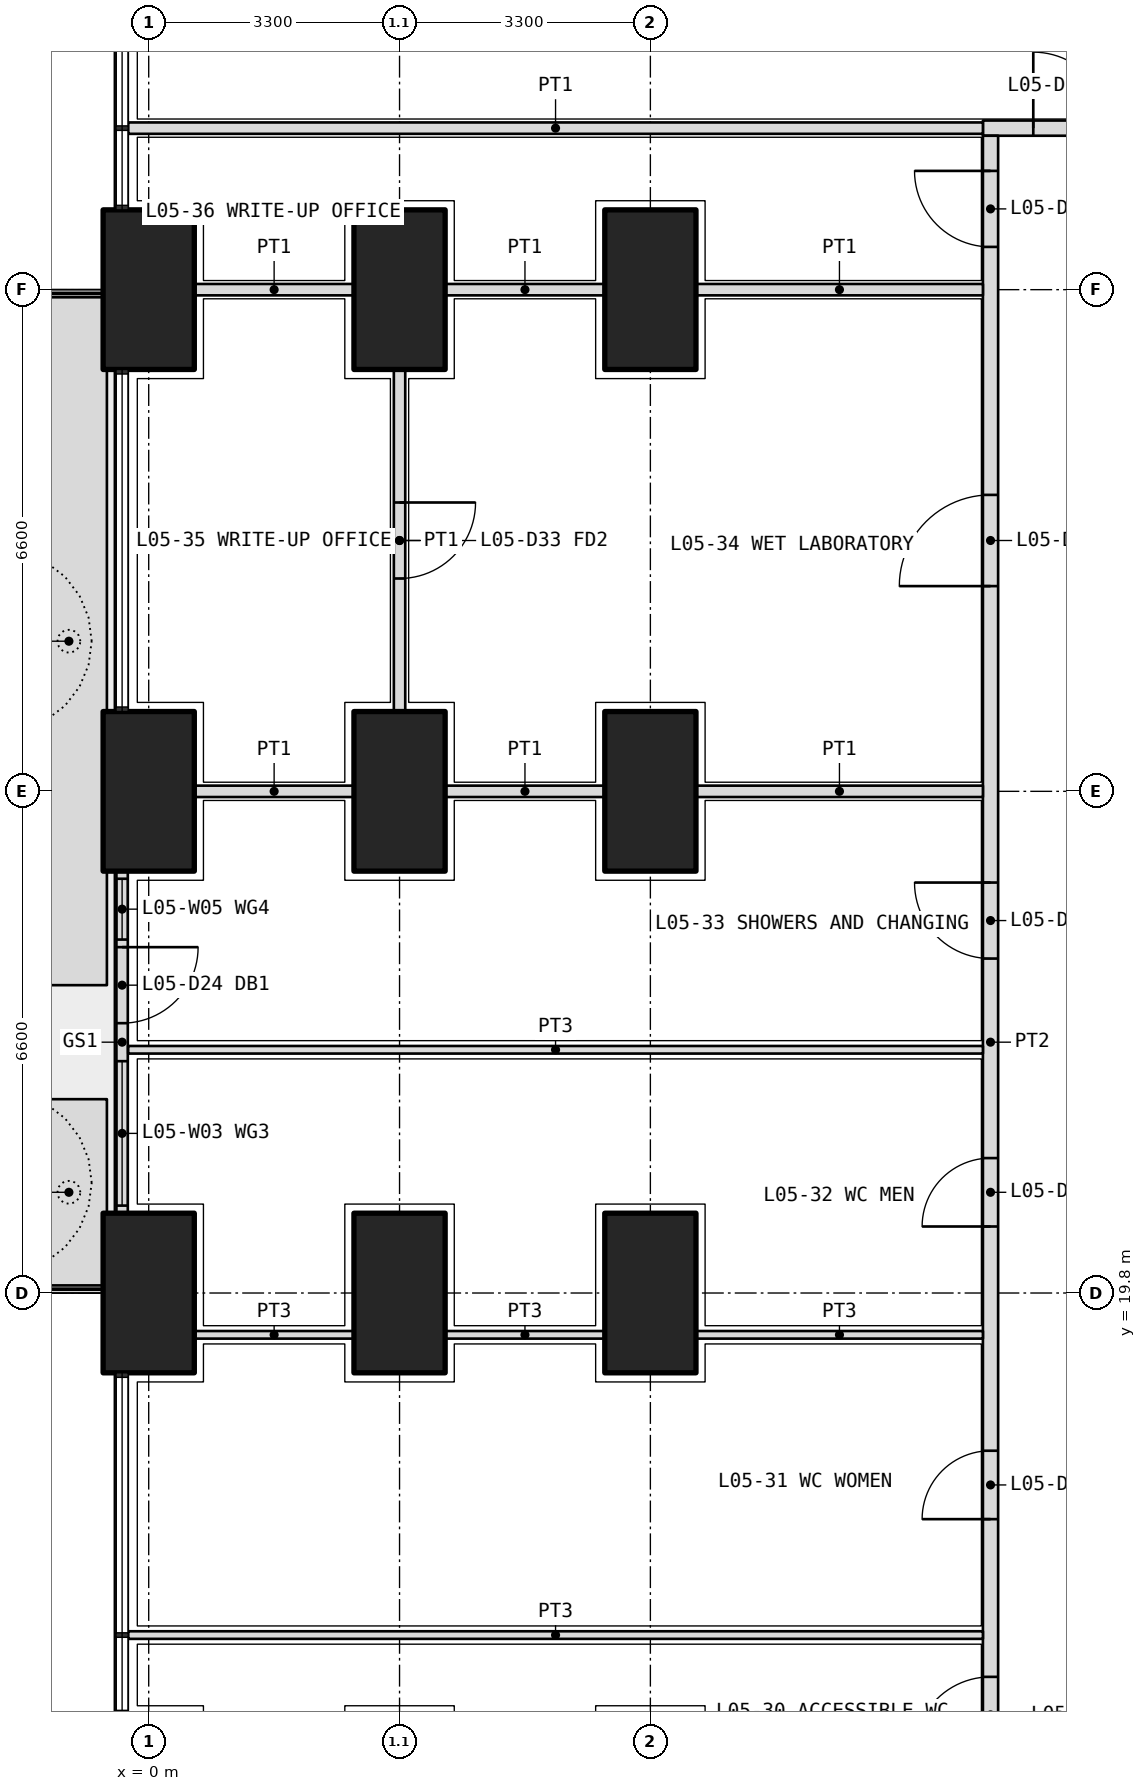
"""IFC4 building model, lengths in metres.
Left out: names, types, materials, properties, quantities, classifications, styles, units other than length and angle.
Written with IfcOpenShell. Run it as: python <this file> out.ifc"""

import sys

from ifc_helpers import new_model, si_unit, direction, frame, frame_2d, origin, origin_2d, place, context, subcontext, project, spatial, polyline, rectangle, outline, extrude, element, fill, save


model = new_model("IFC4")
c1 = context("Model", 3, precision=1e-05, world=origin(), true_north=direction((0.0, 1.0)))
c2 = subcontext(c1, "Body", "Model", "MODEL_VIEW")
j1 = project(units=[si_unit("LENGTHUNIT", "METRE"), si_unit("PLANEANGLEUNIT", "RADIAN")], contexts=[c1])
p1 = place(None, origin())
s1 = spatial("IfcSite", under=j1, at=p1, CompositionType="ELEMENT")
p2 = place(p1, origin())
s2 = spatial("IfcBuilding", under=s1, at=p2, CompositionType="ELEMENT")
p3 = place(p2, frame((0.0, 0.0, 25.5)))
s3 = spatial("IfcBuildingStorey", under=s2, at=p3, CompositionType="ELEMENT", Elevation=25.5)
for number, where, z_axis, x_axis in (
    (1, (0.0, 19.8, 0.0), (0.0, 0.0, 1.0), (0.0, 1.0, 0.0)),
    (2, (0.0, 26.4, 0.0), (0.0, 0.0, 1.0), (0.0, 1.0, 0.0)),
    (3, (0.0, 33.0, 0.0), (0.0, 0.0, 1.0), (0.0, 1.0, 0.0)),
    (4, (3.3, 19.8, 0.0), (0.0, 0.0, 1.0), (0.0, 1.0, 0.0)),
    (5, (3.3, 26.4, 0.0), (0.0, 0.0, 1.0), (0.0, 1.0, 0.0)),
    (6, (3.3, 33.0, 0.0), (0.0, 0.0, 1.0), (0.0, 1.0, 0.0)),
    (7, (6.6, 19.8, 0.0), (0.0, 0.0, 1.0), (0.0, 1.0, 0.0)),
    (8, (6.6, 26.4, 0.0), (0.0, 0.0, 1.0), (0.0, 1.0, 0.0)),
    (9, (6.6, 33.0, 0.0), (0.0, 0.0, 1.0), (0.0, 1.0, 0.0)),
):
    element("IfcColumn", number, at=place(p3, frame(where, z_axis=z_axis, x_axis=x_axis)), inside=s3, PredefinedType="COLUMN", context=c2, shape_type="SweptSolid", body=[
        extrude(rectangle(XDim=2.1, YDim=1.2, at=origin_2d()), origin(), (0.0, 0.0, 1.0), 4.2),
    ])
p4 = place(p3, origin())
e10 = element("IfcWall", 10, at=p4, inside=s3, PredefinedType="USERDEFINED", context=c2, shape_type="SweptSolid", body=[
    extrude(outline(polyline([(-1.55, 19.9), (-0.55, 19.9), (-0.55, 22.35), (-1.55, 22.35), (-1.55, 19.9)]), holes=[polyline([(-1.4, 20.05), (-0.7, 20.05), (-0.7, 22.2), (-1.4, 22.2), (-1.4, 20.05)])]), origin(), (0.0, 0.0, 1.0), 1.05),
])
p5 = place(p3, origin())
e11 = element("IfcWall", 11, at=p5, inside=s3, PredefinedType="USERDEFINED", context=c2, shape_type="SweptSolid", body=[
    extrude(outline(polyline([(-1.55, 23.85), (-0.55, 23.85), (-0.55, 32.9), (-1.55, 32.9), (-1.55, 23.85)]), holes=[polyline([(-1.4, 24.0), (-0.7, 24.0), (-0.7, 32.75), (-1.4, 32.75), (-1.4, 24.0)])]), origin(), (0.0, 0.0, 1.0), 1.05),
])
p6 = place(p3, frame((-0.35, 25.35, 0.0), z_axis=(0.0, 0.0, 1.0), x_axis=(0.0, -1.0, 0.0)))
e12 = element("IfcWall", 12, at=p6, inside=s3, PredefinedType="SOLIDWALL", context=c2, shape_type="SweptSolid", body=[
    extrude(rectangle(XDim=4.5, YDim=0.15, at=frame_2d((2.25, 0.0))), origin(), (0.0, 0.0, 1.0), 2.7),
])
p7 = place(p6, frame((1.0, 0.0, 0.0)))
e13 = element("IfcOpeningElement", 13, at=p7, cuts=e12, PredefinedType="OPENING", context=c2, shape_type="SweptSolid", body=[
    extrude(rectangle(XDim=1.0, YDim=2.4, at=frame_2d((0.5, 1.2))), frame((0.0, 0.085, 0.0), z_axis=(0.0, -1.0, 0.0), x_axis=(1.0, 0.0, 0.0)), (0.0, 0.0, 1.0), 0.17),
])
p8 = place(p6, frame((0.1, 0.0, 0.1)))
e14 = element("IfcOpeningElement", 14, at=p8, cuts=e12, PredefinedType="OPENING", context=c2, shape_type="SweptSolid", body=[
    extrude(rectangle(XDim=0.8, YDim=2.3, at=frame_2d((0.4, 1.15))), frame((0.0, 0.085, 0.0), z_axis=(0.0, -1.0, 0.0), x_axis=(1.0, 0.0, 0.0)), (0.0, 0.0, 1.0), 0.17),
])
p9 = place(p6, frame((2.5, 0.0, 0.1)))
e15 = element("IfcOpeningElement", 15, at=p9, cuts=e12, PredefinedType="OPENING", context=c2, shape_type="SweptSolid", body=[
    extrude(rectangle(XDim=1.9, YDim=2.3, at=frame_2d((0.95, 1.15))), frame((0.0, 0.085, 0.0), z_axis=(0.0, -1.0, 0.0), x_axis=(1.0, 0.0, 0.0)), (0.0, 0.0, 1.0), 0.17),
])
p10 = place(p3, frame((10.975, 35.125, 0.0), z_axis=(0.0, 0.0, 1.0), x_axis=(1.0, 0.0, 0.0)))
e16 = element("IfcWall", 16, at=p10, inside=s3, PredefinedType="PARTITIONING", context=c2, shape_type="SweptSolid", body=[
    extrude(rectangle(XDim=30.85, YDim=0.2, at=frame_2d((15.425, 0.0))), origin(), (0.0, 0.0, 1.0), 2.85),
])
p11 = place(p10, frame((0.663, 0.0, 0.0)))
e17 = element("IfcOpeningElement", 17, at=p11, cuts=e16, PredefinedType="OPENING", context=c2, shape_type="SweptSolid", body=[
    extrude(rectangle(XDim=1.0, YDim=2.1, at=frame_2d((0.5, 1.05))), frame((0.0, 0.11, 0.0), z_axis=(0.0, -1.0, 0.0), x_axis=(1.0, 0.0, 0.0)), (0.0, 0.0, 1.0), 0.22),
])
p12 = place(p10, frame((4.925, 0.0, 0.0)))
e18 = element("IfcOpeningElement", 18, at=p12, cuts=e16, PredefinedType="OPENING", context=c2, shape_type="SweptSolid", body=[
    extrude(rectangle(XDim=1.2, YDim=2.1, at=frame_2d((0.6, 1.05))), frame((0.0, 0.11, 0.0), z_axis=(0.0, -1.0, 0.0), x_axis=(1.0, 0.0, 0.0)), (0.0, 0.0, 1.0), 0.22),
])
p13 = place(p10, frame((9.975, 0.0, 0.0)))
e19 = element("IfcOpeningElement", 19, at=p13, cuts=e16, PredefinedType="OPENING", context=c2, shape_type="SweptSolid", body=[
    extrude(rectangle(XDim=1.0, YDim=2.1, at=frame_2d((0.5, 1.05))), frame((0.0, 0.11, 0.0), z_axis=(0.0, -1.0, 0.0), x_axis=(1.0, 0.0, 0.0)), (0.0, 0.0, 1.0), 0.22),
])
p14 = place(p10, frame((13.725, 0.0, 0.0)))
e20 = element("IfcOpeningElement", 20, at=p14, cuts=e16, PredefinedType="OPENING", context=c2, shape_type="SweptSolid", body=[
    extrude(rectangle(XDim=1.0, YDim=2.1, at=frame_2d((0.5, 1.05))), frame((0.0, 0.11, 0.0), z_axis=(0.0, -1.0, 0.0), x_axis=(1.0, 0.0, 0.0)), (0.0, 0.0, 1.0), 0.22),
])
p15 = place(p10, frame((17.025, 0.0, 0.0)))
e21 = element("IfcOpeningElement", 21, at=p15, cuts=e16, PredefinedType="OPENING", context=c2, shape_type="SweptSolid", body=[
    extrude(rectangle(XDim=1.0, YDim=2.1, at=frame_2d((0.5, 1.05))), frame((0.0, 0.11, 0.0), z_axis=(0.0, -1.0, 0.0), x_axis=(1.0, 0.0, 0.0)), (0.0, 0.0, 1.0), 0.22),
])
p16 = place(p10, frame((24.137, 0.0, 0.0)))
e22 = element("IfcOpeningElement", 22, at=p16, cuts=e16, PredefinedType="OPENING", context=c2, shape_type="SweptSolid", body=[
    extrude(rectangle(XDim=1.2, YDim=2.1, at=frame_2d((0.6, 1.05))), frame((0.0, 0.11, 0.0), z_axis=(0.0, -1.0, 0.0), x_axis=(1.0, 0.0, 0.0)), (0.0, 0.0, 1.0), 0.22),
])
p17 = place(p3, frame((11.075, 11.175, 0.0), z_axis=(0.0, 0.0, 1.0), x_axis=(0.0, 1.0, 0.0)))
e23 = element("IfcWall", 23, at=p17, inside=s3, PredefinedType="PARTITIONING", context=c2, shape_type="SweptSolid", body=[
    extrude(rectangle(XDim=23.85, YDim=0.2, at=frame_2d((11.925, 0.0))), origin(), (0.0, 0.0, 1.0), 2.85),
])
p18 = place(p17, frame((0.363, 0.0, 0.0)))
e24 = element("IfcOpeningElement", 24, at=p18, cuts=e23, PredefinedType="OPENING", context=c2, shape_type="SweptSolid", body=[
    extrude(rectangle(XDim=1.2, YDim=2.1, at=frame_2d((0.6, 1.05))), frame((0.0, 0.11, 0.0), z_axis=(0.0, -1.0, 0.0), x_axis=(1.0, 0.0, 0.0)), (0.0, 0.0, 1.0), 0.22),
])
p19 = place(p17, frame((2.575, 0.0, 0.0)))
e25 = element("IfcOpeningElement", 25, at=p19, cuts=e23, PredefinedType="OPENING", context=c2, shape_type="SweptSolid", body=[
    extrude(rectangle(XDim=1.0, YDim=2.1, at=frame_2d((0.5, 1.05))), frame((0.0, 0.11, 0.0), z_axis=(0.0, -1.0, 0.0), x_axis=(1.0, 0.0, 0.0)), (0.0, 0.0, 1.0), 0.22),
])
p20 = place(p17, frame((5.65, 0.0, 0.0)))
e26 = element("IfcOpeningElement", 26, at=p20, cuts=e23, PredefinedType="OPENING", context=c2, shape_type="SweptSolid", body=[
    extrude(rectangle(XDim=0.9, YDim=2.1, at=frame_2d((0.45, 1.05))), frame((0.0, 0.11, 0.0), z_axis=(0.0, -1.0, 0.0), x_axis=(1.0, 0.0, 0.0)), (0.0, 0.0, 1.0), 0.22),
])
p21 = place(p17, frame((9.5, 0.0, 0.0)))
e27 = element("IfcOpeningElement", 27, at=p21, cuts=e23, PredefinedType="OPENING", context=c2, shape_type="SweptSolid", body=[
    extrude(rectangle(XDim=0.9, YDim=2.1, at=frame_2d((0.45, 1.05))), frame((0.0, 0.11, 0.0), z_axis=(0.0, -1.0, 0.0), x_axis=(1.0, 0.0, 0.0)), (0.0, 0.0, 1.0), 0.22),
])
p22 = place(p17, frame((13.025, 0.0, 0.0)))
e28 = element("IfcOpeningElement", 28, at=p22, cuts=e23, PredefinedType="OPENING", context=c2, shape_type="SweptSolid", body=[
    extrude(rectangle(XDim=1.0, YDim=2.1, at=frame_2d((0.5, 1.05))), frame((0.0, 0.11, 0.0), z_axis=(0.0, -1.0, 0.0), x_axis=(1.0, 0.0, 0.0)), (0.0, 0.0, 1.0), 0.22),
])
p23 = place(p17, frame((17.925, 0.0, 0.0)))
e29 = element("IfcOpeningElement", 29, at=p23, cuts=e23, PredefinedType="OPENING", context=c2, shape_type="SweptSolid", body=[
    extrude(rectangle(XDim=1.2, YDim=2.1, at=frame_2d((0.6, 1.05))), frame((0.0, 0.11, 0.0), z_axis=(0.0, -1.0, 0.0), x_axis=(1.0, 0.0, 0.0)), (0.0, 0.0, 1.0), 0.22),
])
p24 = place(p17, frame((22.387, 0.0, 0.0)))
e30 = element("IfcOpeningElement", 30, at=p24, cuts=e23, PredefinedType="OPENING", context=c2, shape_type="SweptSolid", body=[
    extrude(rectangle(XDim=1.0, YDim=2.1, at=frame_2d((0.5, 1.05))), frame((0.0, 0.11, 0.0), z_axis=(0.0, -1.0, 0.0), x_axis=(1.0, 0.0, 0.0)), (0.0, 0.0, 1.0), 0.22),
])
p25 = place(p3, frame((-0.27, 35.125, 0.0), z_axis=(0.0, 0.0, 1.0), x_axis=(1.0, 0.0, 0.0)))
e31 = element("IfcWall", 31, at=p25, inside=s3, PredefinedType="PARTITIONING", context=c2, shape_type="SweptSolid", body=[
    extrude(rectangle(XDim=11.245, YDim=0.15, at=frame_2d((5.623, 0.0))), origin(), (0.0, 0.0, 1.0), 2.7),
])
p26 = place(p3, frame((3.3, 31.95, 0.0), z_axis=(0.0, 0.0, 1.0), x_axis=(0.0, -1.0, 0.0)))
e32 = element("IfcWall", 32, at=p26, inside=s3, PredefinedType="PARTITIONING", context=c2, shape_type="SweptSolid", body=[
    extrude(rectangle(XDim=4.5, YDim=0.15, at=frame_2d((2.25, 0.0))), origin(), (0.0, 0.0, 1.0), 3.9),
])
p27 = place(p26, frame((1.75, 0.0, 0.0)))
e33 = element("IfcOpeningElement", 33, at=p27, cuts=e32, PredefinedType="OPENING", context=c2, shape_type="SweptSolid", body=[
    extrude(rectangle(XDim=1.0, YDim=2.1, at=frame_2d((0.5, 1.05))), frame((0.0, 0.085, 0.0), z_axis=(0.0, -1.0, 0.0), x_axis=(1.0, 0.0, 0.0)), (0.0, 0.0, 1.0), 0.17),
])
p28 = place(p3, frame((-0.27, 15.3, 0.0), z_axis=(0.0, 0.0, 1.0), x_axis=(1.0, 0.0, 0.0)))
e34 = element("IfcWall", 34, at=p28, inside=s3, PredefinedType="PARTITIONING", context=c2, shape_type="SweptSolid", body=[
    extrude(rectangle(XDim=11.245, YDim=0.1, at=frame_2d((5.623, 0.0))), origin(), (0.0, 0.0, 1.0), 2.7),
])
p29 = place(p3, frame((0.6, 19.25, 0.0), z_axis=(0.0, 0.0, 1.0), x_axis=(1.0, 0.0, 0.0)))
e35 = element("IfcWall", 35, at=p29, inside=s3, PredefinedType="PARTITIONING", context=c2, shape_type="SweptSolid", body=[
    extrude(rectangle(XDim=2.1, YDim=0.1, at=frame_2d((1.05, 0.0))), origin(), (0.0, 0.0, 1.0), 2.85),
])
p30 = place(p3, frame((3.9, 19.25, 0.0), z_axis=(0.0, 0.0, 1.0), x_axis=(1.0, 0.0, 0.0)))
e36 = element("IfcWall", 36, at=p30, inside=s3, PredefinedType="PARTITIONING", context=c2, shape_type="SweptSolid", body=[
    extrude(rectangle(XDim=2.1, YDim=0.1, at=frame_2d((1.05, 0.0))), origin(), (0.0, 0.0, 1.0), 2.85),
])
p31 = place(p3, frame((7.2, 19.25, 0.0), z_axis=(0.0, 0.0, 1.0), x_axis=(1.0, 0.0, 0.0)))
e37 = element("IfcWall", 37, at=p31, inside=s3, PredefinedType="PARTITIONING", context=c2, shape_type="SweptSolid", body=[
    extrude(rectangle(XDim=3.775, YDim=0.1, at=frame_2d((1.888, 0.0))), origin(), (0.0, 0.0, 1.0), 2.85),
])
p32 = place(p3, frame((-0.27, 23.0, 0.0), z_axis=(0.0, 0.0, 1.0), x_axis=(1.0, 0.0, 0.0)))
e38 = element("IfcWall", 38, at=p32, inside=s3, PredefinedType="PARTITIONING", context=c2, shape_type="SweptSolid", body=[
    extrude(rectangle(XDim=11.245, YDim=0.1, at=frame_2d((5.623, 0.0))), origin(), (0.0, 0.0, 1.0), 2.7),
])
p33 = place(p3, frame((0.6, 26.4, 0.0), z_axis=(0.0, 0.0, 1.0), x_axis=(1.0, 0.0, 0.0)))
e39 = element("IfcWall", 39, at=p33, inside=s3, PredefinedType="PARTITIONING", context=c2, shape_type="SweptSolid", body=[
    extrude(rectangle(XDim=2.1, YDim=0.15, at=frame_2d((1.05, 0.0))), origin(), (0.0, 0.0, 1.0), 2.85),
])
p34 = place(p3, frame((3.9, 26.4, 0.0), z_axis=(0.0, 0.0, 1.0), x_axis=(1.0, 0.0, 0.0)))
e40 = element("IfcWall", 40, at=p34, inside=s3, PredefinedType="PARTITIONING", context=c2, shape_type="SweptSolid", body=[
    extrude(rectangle(XDim=2.1, YDim=0.15, at=frame_2d((1.05, 0.0))), origin(), (0.0, 0.0, 1.0), 2.85),
])
p35 = place(p3, frame((7.2, 26.4, 0.0), z_axis=(0.0, 0.0, 1.0), x_axis=(1.0, 0.0, 0.0)))
e41 = element("IfcWall", 41, at=p35, inside=s3, PredefinedType="PARTITIONING", context=c2, shape_type="SweptSolid", body=[
    extrude(rectangle(XDim=3.775, YDim=0.15, at=frame_2d((1.888, 0.0))), origin(), (0.0, 0.0, 1.0), 2.85),
])
p36 = place(p3, frame((0.6, 33.0, 0.0), z_axis=(0.0, 0.0, 1.0), x_axis=(1.0, 0.0, 0.0)))
e42 = element("IfcWall", 42, at=p36, inside=s3, PredefinedType="PARTITIONING", context=c2, shape_type="SweptSolid", body=[
    extrude(rectangle(XDim=2.1, YDim=0.15, at=frame_2d((1.05, 0.0))), origin(), (0.0, 0.0, 1.0), 2.85),
])
p37 = place(p3, frame((3.9, 33.0, 0.0), z_axis=(0.0, 0.0, 1.0), x_axis=(1.0, 0.0, 0.0)))
e43 = element("IfcWall", 43, at=p37, inside=s3, PredefinedType="PARTITIONING", context=c2, shape_type="SweptSolid", body=[
    extrude(rectangle(XDim=2.1, YDim=0.15, at=frame_2d((1.05, 0.0))), origin(), (0.0, 0.0, 1.0), 2.85),
])
p38 = place(p3, frame((7.2, 33.0, 0.0), z_axis=(0.0, 0.0, 1.0), x_axis=(1.0, 0.0, 0.0)))
e44 = element("IfcWall", 44, at=p38, inside=s3, PredefinedType="PARTITIONING", context=c2, shape_type="SweptSolid", body=[
    extrude(rectangle(XDim=3.775, YDim=0.15, at=frame_2d((1.888, 0.0))), origin(), (0.0, 0.0, 1.0), 2.85),
])
p39 = place(p7, origin())
e45 = element("IfcDoor", 45, at=p39, inside=s3, OperationType="SINGLE_SWING_LEFT", PredefinedType="DOOR", context=c2, shape_type="SweptSolid", body=[
    extrude(rectangle(XDim=1.0, YDim=2.4, at=frame_2d((0.5, 1.2))), frame((0.0, 0.025, 0.0), z_axis=(0.0, -1.0, 0.0), x_axis=(1.0, 0.0, 0.0)), (0.0, 0.0, 1.0), 0.05),
])
fill(e13, e45)
p40 = place(p8, origin())
e46 = element("IfcWindow", 46, at=p40, inside=s3, PartitioningType="SINGLE_PANEL", PredefinedType="WINDOW", context=c2, shape_type="SweptSolid", body=[
    extrude(rectangle(XDim=0.8, YDim=2.3, at=frame_2d((0.4, 1.15))), frame((0.0, 0.03, 0.0), z_axis=(0.0, -1.0, 0.0), x_axis=(1.0, 0.0, 0.0)), (0.0, 0.0, 1.0), 0.06),
])
fill(e14, e46)
p41 = place(p9, origin())
e47 = element("IfcWindow", 47, at=p41, inside=s3, PartitioningType="SINGLE_PANEL", PredefinedType="WINDOW", context=c2, shape_type="SweptSolid", body=[
    extrude(rectangle(XDim=1.9, YDim=2.3, at=frame_2d((0.95, 1.15))), frame((0.0, 0.03, 0.0), z_axis=(0.0, -1.0, 0.0), x_axis=(1.0, 0.0, 0.0)), (0.0, 0.0, 1.0), 0.06),
])
fill(e15, e47)
p42 = place(p11, origin())
e48 = element("IfcDoor", 48, at=p42, inside=s3, OperationType="SINGLE_SWING_LEFT", PredefinedType="DOOR", context=c2, shape_type="SweptSolid", body=[
    extrude(rectangle(XDim=1.0, YDim=2.1, at=frame_2d((0.5, 1.05))), frame((0.0, 0.025, 0.0), z_axis=(0.0, -1.0, 0.0), x_axis=(1.0, 0.0, 0.0)), (0.0, 0.0, 1.0), 0.05),
])
fill(e17, e48)
p43 = place(p19, origin())
e49 = element("IfcDoor", 49, at=p43, inside=s3, OperationType="SINGLE_SWING_LEFT", PredefinedType="DOOR", context=c2, shape_type="SweptSolid", body=[
    extrude(rectangle(XDim=1.0, YDim=2.1, at=frame_2d((0.5, 1.05))), frame((0.0, 0.025, 0.0), z_axis=(0.0, -1.0, 0.0), x_axis=(1.0, 0.0, 0.0)), (0.0, 0.0, 1.0), 0.05),
])
fill(e25, e49)
p44 = place(p20, origin())
e50 = element("IfcDoor", 50, at=p44, inside=s3, OperationType="SINGLE_SWING_LEFT", PredefinedType="DOOR", context=c2, shape_type="SweptSolid", body=[
    extrude(rectangle(XDim=0.9, YDim=2.1, at=frame_2d((0.45, 1.05))), frame((0.0, 0.025, 0.0), z_axis=(0.0, -1.0, 0.0), x_axis=(1.0, 0.0, 0.0)), (0.0, 0.0, 1.0), 0.05),
])
fill(e26, e50)
p45 = place(p21, origin())
e51 = element("IfcDoor", 51, at=p45, inside=s3, OperationType="SINGLE_SWING_LEFT", PredefinedType="DOOR", context=c2, shape_type="SweptSolid", body=[
    extrude(rectangle(XDim=0.9, YDim=2.1, at=frame_2d((0.45, 1.05))), frame((0.0, 0.025, 0.0), z_axis=(0.0, -1.0, 0.0), x_axis=(1.0, 0.0, 0.0)), (0.0, 0.0, 1.0), 0.05),
])
fill(e27, e51)
p46 = place(p22, origin())
e52 = element("IfcDoor", 52, at=p46, inside=s3, OperationType="SINGLE_SWING_RIGHT", PredefinedType="DOOR", context=c2, shape_type="SweptSolid", body=[
    extrude(rectangle(XDim=1.0, YDim=2.1, at=frame_2d((0.5, 1.05))), frame((0.0, 0.025, 0.0), z_axis=(0.0, -1.0, 0.0), x_axis=(1.0, 0.0, 0.0)), (0.0, 0.0, 1.0), 0.05),
])
fill(e28, e52)
p47 = place(p23, origin())
e53 = element("IfcDoor", 53, at=p47, inside=s3, OperationType="DOUBLE_DOOR_SINGLE_SWING", PredefinedType="DOOR", context=c2, shape_type="SweptSolid", body=[
    extrude(rectangle(XDim=1.2, YDim=2.1, at=frame_2d((0.6, 1.05))), frame((0.0, 0.025, 0.0), z_axis=(0.0, -1.0, 0.0), x_axis=(1.0, 0.0, 0.0)), (0.0, 0.0, 1.0), 0.05),
])
fill(e29, e53)
p48 = place(p27, origin())
e54 = element("IfcDoor", 54, at=p48, inside=s3, OperationType="SINGLE_SWING_LEFT", PredefinedType="DOOR", context=c2, shape_type="SweptSolid", body=[
    extrude(rectangle(XDim=1.0, YDim=2.1, at=frame_2d((0.5, 1.05))), frame((0.0, 0.025, 0.0), z_axis=(0.0, -1.0, 0.0), x_axis=(1.0, 0.0, 0.0)), (0.0, 0.0, 1.0), 0.05),
])
fill(e33, e54)
p49 = place(p24, origin())
e55 = element("IfcDoor", 55, at=p49, inside=s3, OperationType="SINGLE_SWING_RIGHT", PredefinedType="DOOR", context=c2, shape_type="SweptSolid", body=[
    extrude(rectangle(XDim=1.0, YDim=2.1, at=frame_2d((0.5, 1.05))), frame((0.0, 0.025, 0.0), z_axis=(0.0, -1.0, 0.0), x_axis=(1.0, 0.0, 0.0)), (0.0, 0.0, 1.0), 0.05),
])
fill(e30, e55)
save(model, sys.argv[1])
